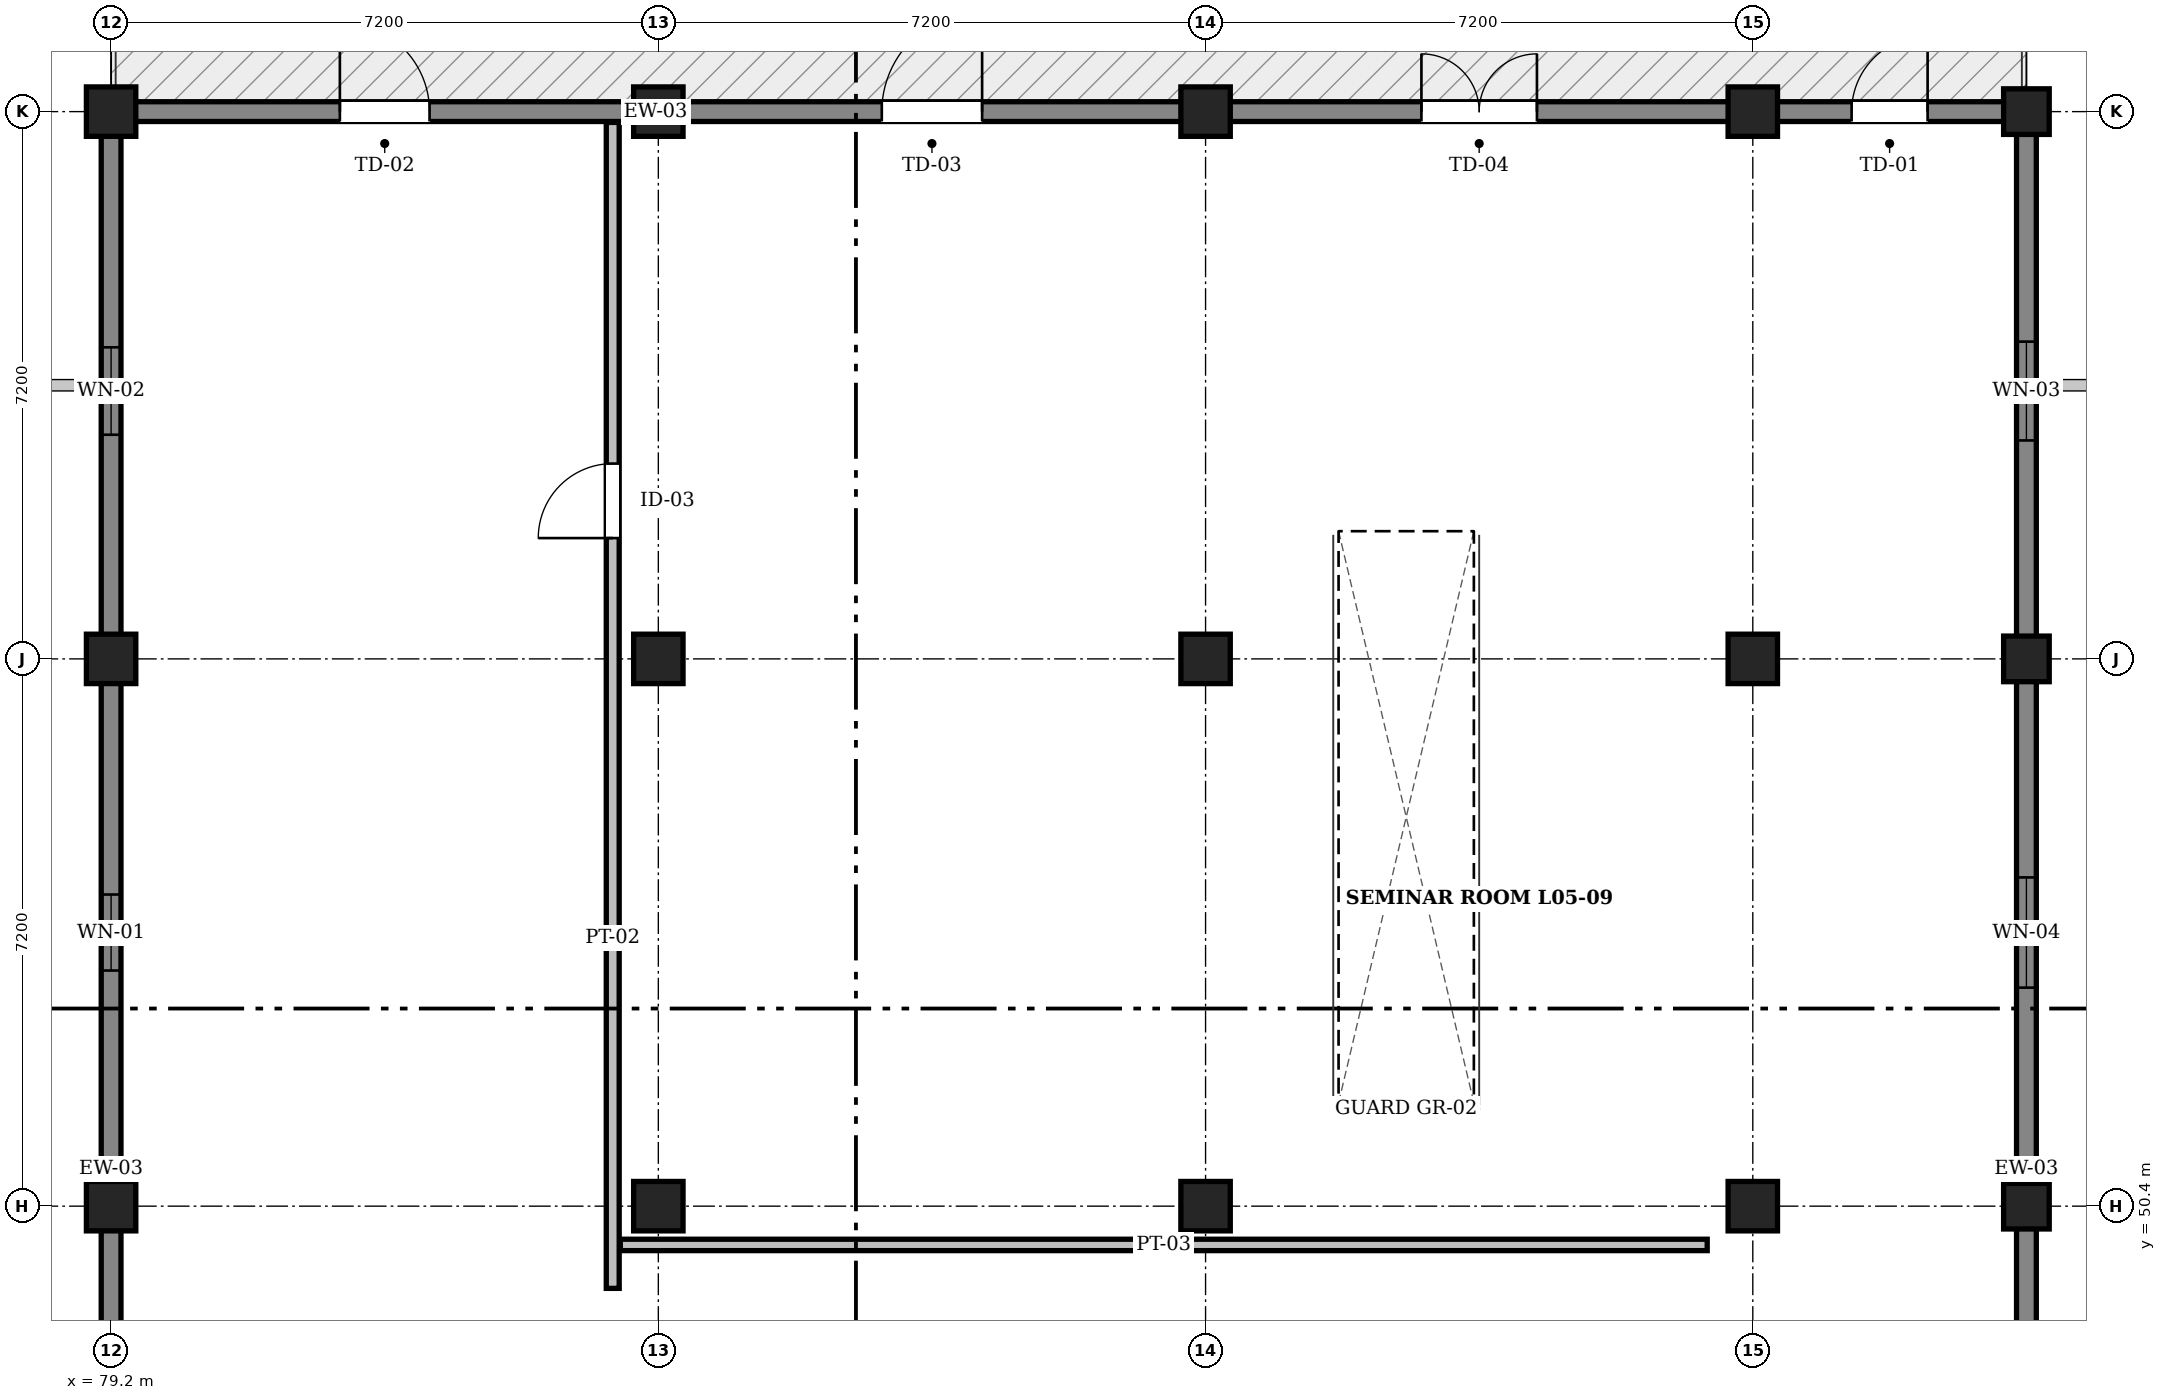
"""IFC4 building model, lengths in metres.
Left out: names, types, materials, properties, quantities, classifications, styles, units other than length and angle.
Written with IfcOpenShell. Run it as: python <this file> out.ifc"""

import sys

from ifc_helpers import new_model, si_unit, direction, frame, frame_2d, origin, origin_2d, place, context, subcontext, project, spatial, rectangle, extrude, element, fill, save


model = new_model("IFC4")
c1 = context("Model", 3, precision=1e-05, world=origin(), true_north=direction((0.0, 1.0)))
c2 = subcontext(c1, "Body", "Model", "MODEL_VIEW")
j1 = project(units=[si_unit("LENGTHUNIT", "METRE"), si_unit("PLANEANGLEUNIT", "RADIAN")], contexts=[c1])
p1 = place(None, origin())
s1 = spatial("IfcSite", under=j1, at=p1, CompositionType="ELEMENT")
p2 = place(p1, origin())
s2 = spatial("IfcBuilding", under=s1, at=p2, CompositionType="ELEMENT")
p3 = place(p2, frame((0.0, 0.0, 23.4)))
s3 = spatial("IfcBuildingStorey", under=s2, at=p3, CompositionType="ELEMENT", Elevation=23.4)
for number, where, z_axis, x_axis in (
    (1, (79.2, 50.4, 0.0), (0.0, 0.0, 1.0), (1.0, 0.0, 0.0)),
    (2, (79.2, 57.6, 0.0), (0.0, 0.0, 1.0), (1.0, 0.0, 0.0)),
    (3, (79.2, 64.8, 0.0), (0.0, 0.0, 1.0), (1.0, 0.0, 0.0)),
    (4, (86.4, 50.4, 0.0), (0.0, 0.0, 1.0), (1.0, 0.0, 0.0)),
    (5, (86.4, 57.6, 0.0), (0.0, 0.0, 1.0), (1.0, 0.0, 0.0)),
    (6, (86.4, 64.8, 0.0), (0.0, 0.0, 1.0), (1.0, 0.0, 0.0)),
    (7, (93.6, 50.4, 0.0), (0.0, 0.0, 1.0), (1.0, 0.0, 0.0)),
    (8, (93.6, 57.6, 0.0), (0.0, 0.0, 1.0), (1.0, 0.0, 0.0)),
    (9, (93.6, 64.8, 0.0), (0.0, 0.0, 1.0), (1.0, 0.0, 0.0)),
    (10, (100.8, 50.4, 0.0), (0.0, 0.0, 1.0), (1.0, 0.0, 0.0)),
    (11, (100.8, 57.6, 0.0), (0.0, 0.0, 1.0), (1.0, 0.0, 0.0)),
    (12, (100.8, 64.8, 0.0), (0.0, 0.0, 1.0), (1.0, 0.0, 0.0)),
):
    element("IfcColumn", number, at=place(p3, frame(where, z_axis=z_axis, x_axis=x_axis)), inside=s3, PredefinedType="COLUMN", context=c2, shape_type="SweptSolid", body=[
        extrude(rectangle(XDim=0.65, YDim=0.65, at=origin_2d()), origin(), (0.0, 0.0, 1.0), 4.5),
    ])
for number, where, z_axis, x_axis in (
    (13, (104.4, 50.4, 0.0), (0.0, 0.0, 1.0), (1.0, 0.0, 0.0)),
    (14, (104.4, 57.6, 0.0), (0.0, 0.0, 1.0), (1.0, 0.0, 0.0)),
    (15, (104.4, 64.8, 0.0), (0.0, 0.0, 1.0), (1.0, 0.0, 0.0)),
):
    element("IfcColumn", number, at=place(p3, frame(where, z_axis=z_axis, x_axis=x_axis)), inside=s3, PredefinedType="COLUMN", context=c2, shape_type="SweptSolid", body=[
        extrude(rectangle(XDim=0.6, YDim=0.6, at=origin_2d()), origin(), (0.0, 0.0, 1.0), 4.5),
    ])
p4 = place(p3, frame((79.2, 43.2, 0.0), z_axis=(0.0, 0.0, 1.0), x_axis=(0.0, 1.0, 0.0)))
e16 = element("IfcWall", 16, at=p4, inside=s3, PredefinedType="SOLIDWALL", context=c2, shape_type="SweptSolid", body=[
    extrude(rectangle(XDim=7.2, YDim=0.26, at=frame_2d((3.6, 0.0))), origin(), (0.0, 0.0, 1.0), 4.22),
])
p5 = place(p4, frame((2.68, 0.0, 0.95)))
e17 = element("IfcOpeningElement", 17, at=p5, cuts=e16, PredefinedType="OPENING", context=c2, shape_type="SweptSolid", body=[
    extrude(rectangle(XDim=1.35, YDim=2.05, at=frame_2d((0.675, 1.025))), frame((0.0, 0.142, 0.0), z_axis=(0.0, -1.0, 0.0), x_axis=(1.0, 0.0, 0.0)), (0.0, 0.0, 1.0), 0.284),
])
p6 = place(p3, frame((79.2, 50.4, 0.0), z_axis=(0.0, 0.0, 1.0), x_axis=(0.0, 1.0, 0.0)))
e18 = element("IfcWall", 18, at=p6, inside=s3, PredefinedType="SOLIDWALL", context=c2, shape_type="SweptSolid", body=[
    extrude(rectangle(XDim=7.2, YDim=0.26, at=frame_2d((3.6, 0.0))), origin(), (0.0, 0.0, 1.0), 4.22),
])
p7 = place(p6, frame((3.1, 0.0, 0.95)))
e19 = element("IfcOpeningElement", 19, at=p7, cuts=e18, PredefinedType="OPENING", context=c2, shape_type="SweptSolid", body=[
    extrude(rectangle(XDim=1.0, YDim=1.3, at=frame_2d((0.5, 0.65))), frame((0.0, 0.142, 0.0), z_axis=(0.0, -1.0, 0.0), x_axis=(1.0, 0.0, 0.0)), (0.0, 0.0, 1.0), 0.284),
])
p8 = place(p3, frame((79.2, 57.6, 0.0), z_axis=(0.0, 0.0, 1.0), x_axis=(0.0, 1.0, 0.0)))
e20 = element("IfcWall", 20, at=p8, inside=s3, PredefinedType="SOLIDWALL", context=c2, shape_type="SweptSolid", body=[
    extrude(rectangle(XDim=7.048, YDim=0.26, at=frame_2d((3.524, 0.0))), origin(), (0.0, 0.0, 1.0), 4.22),
])
p9 = place(p8, frame((2.949, 0.0, 0.95)))
e21 = element("IfcOpeningElement", 21, at=p9, cuts=e20, PredefinedType="OPENING", context=c2, shape_type="SweptSolid", body=[
    extrude(rectangle(XDim=1.15, YDim=1.3, at=frame_2d((0.575, 0.65))), frame((0.0, 0.142, 0.0), z_axis=(0.0, -1.0, 0.0), x_axis=(1.0, 0.0, 0.0)), (0.0, 0.0, 1.0), 0.284),
])
p10 = place(p3, frame((79.05, 64.8, 0.0), z_axis=(0.0, 0.0, 1.0), x_axis=(1.0, 0.0, 0.0)))
e22 = element("IfcWall", 22, at=p10, inside=s3, PredefinedType="SOLIDWALL", context=c2, shape_type="SweptSolid", body=[
    extrude(rectangle(XDim=7.35, YDim=0.26, at=frame_2d((3.675, 0.0))), origin(), (0.0, 0.0, 1.0), 4.22),
])
p11 = place(p10, frame((3.16, 0.0, 0.0)))
e23 = element("IfcOpeningElement", 23, at=p11, cuts=e22, PredefinedType="OPENING", context=c2, shape_type="SweptSolid", body=[
    extrude(rectangle(XDim=1.18, YDim=2.18, at=frame_2d((0.59, 1.09))), frame((0.0, 0.142, 0.0), z_axis=(0.0, -1.0, 0.0), x_axis=(1.0, 0.0, 0.0)), (0.0, 0.0, 1.0), 0.284),
])
p12 = place(p3, frame((86.4, 64.8, 0.0), z_axis=(0.0, 0.0, 1.0), x_axis=(1.0, 0.0, 0.0)))
e24 = element("IfcWall", 24, at=p12, inside=s3, PredefinedType="SOLIDWALL", context=c2, shape_type="SweptSolid", body=[
    extrude(rectangle(XDim=7.2, YDim=0.26, at=frame_2d((3.6, 0.0))), origin(), (0.0, 0.0, 1.0), 4.22),
])
p13 = place(p12, frame((2.94, 0.0, 0.0)))
e25 = element("IfcOpeningElement", 25, at=p13, cuts=e24, PredefinedType="OPENING", context=c2, shape_type="SweptSolid", body=[
    extrude(rectangle(XDim=1.32, YDim=2.2, at=frame_2d((0.66, 1.1))), frame((0.0, 0.142, 0.0), z_axis=(0.0, -1.0, 0.0), x_axis=(1.0, 0.0, 0.0)), (0.0, 0.0, 1.0), 0.284),
])
p14 = place(p3, frame((93.6, 64.8, 0.0), z_axis=(0.0, 0.0, 1.0), x_axis=(1.0, 0.0, 0.0)))
e26 = element("IfcWall", 26, at=p14, inside=s3, PredefinedType="SOLIDWALL", context=c2, shape_type="SweptSolid", body=[
    extrude(rectangle(XDim=7.2, YDim=0.26, at=frame_2d((3.6, 0.0))), origin(), (0.0, 0.0, 1.0), 4.22),
])
p15 = place(p14, frame((2.84, 0.0, 0.0)))
e27 = element("IfcOpeningElement", 27, at=p15, cuts=e26, PredefinedType="OPENING", context=c2, shape_type="SweptSolid", body=[
    extrude(rectangle(XDim=1.52, YDim=2.22, at=frame_2d((0.76, 1.11))), frame((0.0, 0.142, 0.0), z_axis=(0.0, -1.0, 0.0), x_axis=(1.0, 0.0, 0.0)), (0.0, 0.0, 1.0), 0.284),
])
p16 = place(p3, frame((100.8, 64.8, 0.0), z_axis=(0.0, 0.0, 1.0), x_axis=(1.0, 0.0, 0.0)))
e28 = element("IfcWall", 28, at=p16, inside=s3, PredefinedType="SOLIDWALL", context=c2, shape_type="SweptSolid", body=[
    extrude(rectangle(XDim=3.75, YDim=0.26, at=frame_2d((1.875, 0.0))), origin(), (0.0, 0.0, 1.0), 4.22),
])
p17 = place(p16, frame((1.3, 0.0, 0.0)))
e29 = element("IfcOpeningElement", 29, at=p17, cuts=e28, PredefinedType="OPENING", context=c2, shape_type="SweptSolid", body=[
    extrude(rectangle(XDim=1.0, YDim=2.15, at=frame_2d((0.5, 1.075))), frame((0.0, 0.142, 0.0), z_axis=(0.0, -1.0, 0.0), x_axis=(1.0, 0.0, 0.0)), (0.0, 0.0, 1.0), 0.284),
])
p18 = place(p3, frame((104.4, 64.648, 0.0), z_axis=(0.0, 0.0, 1.0), x_axis=(0.0, -1.0, 0.0)))
e30 = element("IfcWall", 30, at=p18, inside=s3, PredefinedType="SOLIDWALL", context=c2, shape_type="SweptSolid", body=[
    extrude(rectangle(XDim=7.048, YDim=0.26, at=frame_2d((3.524, 0.0))), origin(), (0.0, 0.0, 1.0), 4.22),
])
p19 = place(p18, frame((2.874, 0.0, 0.95)))
e31 = element("IfcOpeningElement", 31, at=p19, cuts=e30, PredefinedType="OPENING", context=c2, shape_type="SweptSolid", body=[
    extrude(rectangle(XDim=1.3, YDim=1.3, at=frame_2d((0.65, 0.65))), frame((0.0, 0.142, 0.0), z_axis=(0.0, -1.0, 0.0), x_axis=(1.0, 0.0, 0.0)), (0.0, 0.0, 1.0), 0.284),
])
p20 = place(p3, frame((104.4, 57.6, 0.0), z_axis=(0.0, 0.0, 1.0), x_axis=(0.0, -1.0, 0.0)))
e32 = element("IfcWall", 32, at=p20, inside=s3, PredefinedType="SOLIDWALL", context=c2, shape_type="SweptSolid", body=[
    extrude(rectangle(XDim=7.2, YDim=0.26, at=frame_2d((3.6, 0.0))), origin(), (0.0, 0.0, 1.0), 4.22),
])
p21 = place(p20, frame((2.875, 0.0, 0.95)))
e33 = element("IfcOpeningElement", 33, at=p21, cuts=e32, PredefinedType="OPENING", context=c2, shape_type="SweptSolid", body=[
    extrude(rectangle(XDim=1.45, YDim=1.3, at=frame_2d((0.725, 0.65))), frame((0.0, 0.142, 0.0), z_axis=(0.0, -1.0, 0.0), x_axis=(1.0, 0.0, 0.0)), (0.0, 0.0, 1.0), 0.284),
])
p22 = place(p3, frame((104.4, 50.4, 0.0), z_axis=(0.0, 0.0, 1.0), x_axis=(0.0, -1.0, 0.0)))
e34 = element("IfcWall", 34, at=p22, inside=s3, PredefinedType="SOLIDWALL", context=c2, shape_type="SweptSolid", body=[
    extrude(rectangle(XDim=7.2, YDim=0.26, at=frame_2d((3.6, 0.0))), origin(), (0.0, 0.0, 1.0), 4.22),
])
p23 = place(p22, frame((3.045, 0.0, 0.95)))
e35 = element("IfcOpeningElement", 35, at=p23, cuts=e34, PredefinedType="OPENING", context=c2, shape_type="SweptSolid", body=[
    extrude(rectangle(XDim=1.6, YDim=1.3, at=frame_2d((0.8, 0.65))), frame((0.0, 0.142, 0.0), z_axis=(0.0, -1.0, 0.0), x_axis=(1.0, 0.0, 0.0)), (0.0, 0.0, 1.0), 0.284),
])
p24 = place(p3, frame((85.8, 49.319, 0.0), z_axis=(0.0, 0.0, 1.0), x_axis=(0.0, 1.0, 0.0)))
e36 = element("IfcWall", 36, at=p24, inside=s3, PredefinedType="PARTITIONING", context=c2, shape_type="SweptSolid", body=[
    extrude(rectangle(XDim=15.339, YDim=0.17, at=frame_2d((7.67, 0.0))), origin(), (0.0, 0.0, 1.0), 4.16),
])
p25 = place(p24, frame((9.871, 0.0, 0.0)))
e37 = element("IfcOpeningElement", 37, at=p25, cuts=e36, PredefinedType="OPENING", context=c2, shape_type="SweptSolid", body=[
    extrude(rectangle(XDim=0.98, YDim=2.14, at=frame_2d((0.49, 1.07))), frame((0.0, 0.097, 0.0), z_axis=(0.0, -1.0, 0.0), x_axis=(1.0, 0.0, 0.0)), (0.0, 0.0, 1.0), 0.194),
])
p26 = place(p3, frame((85.9, 49.89, 0.0), z_axis=(0.0, 0.0, 1.0), x_axis=(1.0, 0.0, 0.0)))
e38 = element("IfcWall", 38, at=p26, inside=s3, PredefinedType="PARTITIONING", context=c2, shape_type="SweptSolid", body=[
    extrude(rectangle(XDim=14.3, YDim=0.15, at=frame_2d((7.15, 0.0))), origin(), (0.0, 0.0, 1.0), 4.16),
])
p27 = place(p7, origin())
e39 = element("IfcWindow", 39, at=p27, inside=s3, PartitioningType="SINGLE_PANEL", PredefinedType="WINDOW", context=c2, shape_type="SweptSolid", body=[
    extrude(rectangle(XDim=1.0, YDim=1.3, at=frame_2d((0.5, 0.65))), frame((0.0, 0.03, 0.0), z_axis=(0.0, -1.0, 0.0), x_axis=(1.0, 0.0, 0.0)), (0.0, 0.0, 1.0), 0.06),
])
fill(e19, e39)
p28 = place(p9, origin())
e40 = element("IfcWindow", 40, at=p28, inside=s3, PartitioningType="SINGLE_PANEL", PredefinedType="WINDOW", context=c2, shape_type="SweptSolid", body=[
    extrude(rectangle(XDim=1.15, YDim=1.3, at=frame_2d((0.575, 0.65))), frame((0.0, 0.03, 0.0), z_axis=(0.0, -1.0, 0.0), x_axis=(1.0, 0.0, 0.0)), (0.0, 0.0, 1.0), 0.06),
])
fill(e21, e40)
p29 = place(p11, origin())
e41 = element("IfcDoor", 41, at=p29, inside=s3, OperationType="SINGLE_SWING_LEFT", PredefinedType="DOOR", context=c2, shape_type="SweptSolid", body=[
    extrude(rectangle(XDim=1.18, YDim=2.18, at=frame_2d((0.59, 1.09))), frame((0.0, 0.025, 0.0), z_axis=(0.0, -1.0, 0.0), x_axis=(1.0, 0.0, 0.0)), (0.0, 0.0, 1.0), 0.05),
])
fill(e23, e41)
p30 = place(p13, origin())
e42 = element("IfcDoor", 42, at=p30, inside=s3, OperationType="SINGLE_SWING_RIGHT", PredefinedType="DOOR", context=c2, shape_type="SweptSolid", body=[
    extrude(rectangle(XDim=1.32, YDim=2.2, at=frame_2d((0.66, 1.1))), frame((0.0, 0.025, 0.0), z_axis=(0.0, -1.0, 0.0), x_axis=(1.0, 0.0, 0.0)), (0.0, 0.0, 1.0), 0.05),
])
fill(e25, e42)
p31 = place(p15, origin())
e43 = element("IfcDoor", 43, at=p31, inside=s3, OperationType="DOUBLE_DOOR_SINGLE_SWING", PredefinedType="DOOR", context=c2, shape_type="SweptSolid", body=[
    extrude(rectangle(XDim=1.52, YDim=2.22, at=frame_2d((0.76, 1.11))), frame((0.0, 0.025, 0.0), z_axis=(0.0, -1.0, 0.0), x_axis=(1.0, 0.0, 0.0)), (0.0, 0.0, 1.0), 0.05),
])
fill(e27, e43)
p32 = place(p17, origin())
e44 = element("IfcDoor", 44, at=p32, inside=s3, OperationType="SINGLE_SWING_RIGHT", PredefinedType="DOOR", context=c2, shape_type="SweptSolid", body=[
    extrude(rectangle(XDim=1.0, YDim=2.15, at=frame_2d((0.5, 1.075))), frame((0.0, 0.025, 0.0), z_axis=(0.0, -1.0, 0.0), x_axis=(1.0, 0.0, 0.0)), (0.0, 0.0, 1.0), 0.05),
])
fill(e29, e44)
p33 = place(p19, origin())
e45 = element("IfcWindow", 45, at=p33, inside=s3, PartitioningType="SINGLE_PANEL", PredefinedType="WINDOW", context=c2, shape_type="SweptSolid", body=[
    extrude(rectangle(XDim=1.3, YDim=1.3, at=frame_2d((0.65, 0.65))), frame((0.0, 0.03, 0.0), z_axis=(0.0, -1.0, 0.0), x_axis=(1.0, 0.0, 0.0)), (0.0, 0.0, 1.0), 0.06),
])
fill(e31, e45)
p34 = place(p21, origin())
e46 = element("IfcWindow", 46, at=p34, inside=s3, PartitioningType="SINGLE_PANEL", PredefinedType="WINDOW", context=c2, shape_type="SweptSolid", body=[
    extrude(rectangle(XDim=1.45, YDim=1.3, at=frame_2d((0.725, 0.65))), frame((0.0, 0.03, 0.0), z_axis=(0.0, -1.0, 0.0), x_axis=(1.0, 0.0, 0.0)), (0.0, 0.0, 1.0), 0.06),
])
fill(e33, e46)
p35 = place(p25, origin())
e47 = element("IfcDoor", 47, at=p35, inside=s3, OperationType="SINGLE_SWING_LEFT", PredefinedType="DOOR", context=c2, shape_type="SweptSolid", body=[
    extrude(rectangle(XDim=0.98, YDim=2.14, at=frame_2d((0.49, 1.07))), frame((0.0, 0.025, 0.0), z_axis=(0.0, -1.0, 0.0), x_axis=(1.0, 0.0, 0.0)), (0.0, 0.0, 1.0), 0.05),
])
fill(e37, e47)
save(model, sys.argv[1])
